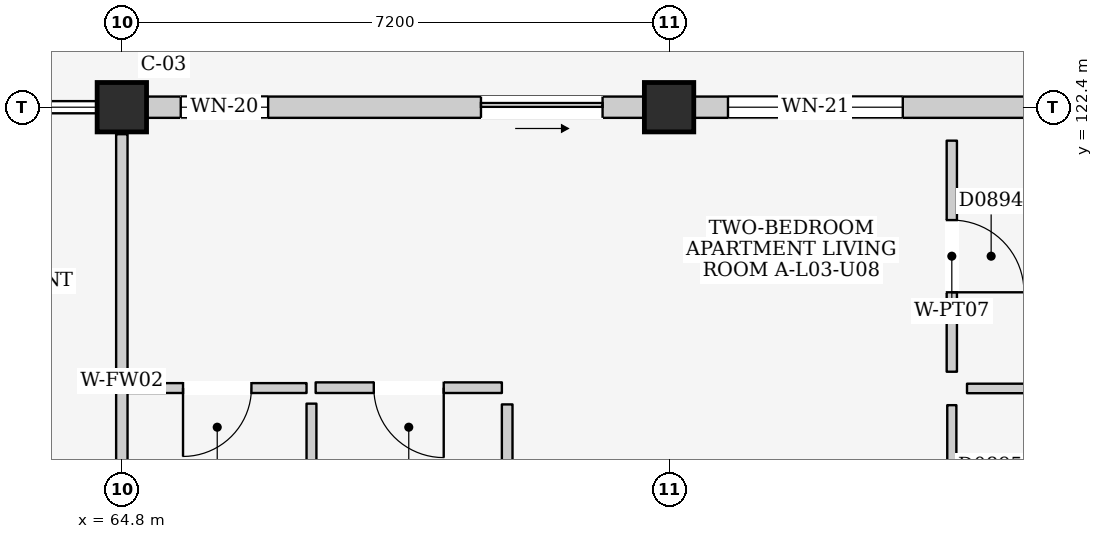
"""IFC4 building model, lengths in metres.
Left out: names, types, materials, properties, quantities, classifications, styles, units other than length and angle.
Written with IfcOpenShell. Run it as: python <this file> out.ifc"""

import sys

from ifc_helpers import new_model, si_unit, direction, frame, frame_2d, origin, origin_2d, place, context, subcontext, project, spatial, rectangle, extrude, element, fill, save


model = new_model("IFC4")
c1 = context("Model", 3, precision=1e-05, world=origin(), true_north=direction((0.0, 1.0)))
c2 = subcontext(c1, "Body", "Model", "MODEL_VIEW")
j1 = project(units=[si_unit("LENGTHUNIT", "METRE"), si_unit("PLANEANGLEUNIT", "RADIAN")], contexts=[c1])
p1 = place(None, origin())
s1 = spatial("IfcSite", under=j1, at=p1, CompositionType="ELEMENT")
p2 = place(p1, origin())
s2 = spatial("IfcBuilding", under=s1, at=p2, CompositionType="ELEMENT")
p3 = place(p2, frame((0.0, 0.0, 12.2)))
s3 = spatial("IfcBuildingStorey", under=s2, at=p3, CompositionType="ELEMENT", Elevation=12.2)
for number, where, z_axis, x_axis in (
    (1, (64.8, 122.4, 0.0), (0.0, 0.0, 1.0), (1.0, 0.0, 0.0)),
    (2, (72.0, 122.4, 0.0), (0.0, 0.0, 1.0), (1.0, 0.0, 0.0)),
):
    element("IfcColumn", number, at=place(p3, frame(where, z_axis=z_axis, x_axis=x_axis)), inside=s3, PredefinedType="COLUMN", context=c2, shape_type="SweptSolid", body=[
        extrude(rectangle(XDim=0.65, YDim=0.65, at=origin_2d()), origin(), (0.0, 0.0, 1.0), 3.2),
    ])
p4 = place(p3, frame((65.125, 122.4, 0.0), z_axis=(0.0, 0.0, 1.0), x_axis=(1.0, 0.0, 0.0)))
e3 = element("IfcWall", 3, at=p4, inside=s3, PredefinedType="ELEMENTEDWALL", context=c2, shape_type="SweptSolid", body=[
    extrude(rectangle(XDim=6.55, YDim=0.28, at=frame_2d((3.275, 0.0))), origin(), (0.0, 0.0, 1.0), 2.445),
])
p5 = place(p4, frame((4.4, 0.0, 0.0)))
e4 = element("IfcOpeningElement", 4, at=p5, cuts=e3, PredefinedType="OPENING", context=c2, shape_type="SweptSolid", body=[
    extrude(rectangle(XDim=1.6, YDim=2.12, at=frame_2d((0.8, 1.06))), frame((0.0, 0.155, 0.0), z_axis=(0.0, -1.0, 0.0), x_axis=(1.0, 0.0, 0.0)), (0.0, 0.0, 1.0), 0.31),
])
p6 = place(p4, frame((0.45, 0.0, 0.9)))
e5 = element("IfcOpeningElement", 5, at=p6, cuts=e3, PredefinedType="OPENING", context=c2, shape_type="SweptSolid", body=[
    extrude(rectangle(XDim=1.15, YDim=1.15, at=frame_2d((0.575, 0.575))), frame((0.0, 0.155, 0.0), z_axis=(0.0, -1.0, 0.0), x_axis=(1.0, 0.0, 0.0)), (0.0, 0.0, 1.0), 0.31),
])
p7 = place(p3, frame((72.325, 122.4, 0.0), z_axis=(0.0, 0.0, 1.0), x_axis=(1.0, 0.0, 0.0)))
e6 = element("IfcWall", 6, at=p7, inside=s3, PredefinedType="ELEMENTEDWALL", context=c2, shape_type="SweptSolid", body=[
    extrude(rectangle(XDim=6.55, YDim=0.28, at=frame_2d((3.275, 0.0))), origin(), (0.0, 0.0, 1.0), 2.445),
])
p8 = place(p7, frame((4.5, 0.0, 0.0)))
e7 = element("IfcOpeningElement", 7, at=p8, cuts=e6, PredefinedType="OPENING", context=c2, shape_type="SweptSolid", body=[
    extrude(rectangle(XDim=1.5, YDim=2.12, at=frame_2d((0.75, 1.06))), frame((0.0, 0.155, 0.0), z_axis=(0.0, -1.0, 0.0), x_axis=(1.0, 0.0, 0.0)), (0.0, 0.0, 1.0), 0.31),
])
p9 = place(p7, frame((0.45, 0.0, 0.735)))
e8 = element("IfcOpeningElement", 8, at=p9, cuts=e6, PredefinedType="OPENING", context=c2, shape_type="SweptSolid", body=[
    extrude(rectangle(XDim=2.3, YDim=1.6, at=frame_2d((1.15, 0.8))), frame((0.0, 0.155, 0.0), z_axis=(0.0, -1.0, 0.0), x_axis=(1.0, 0.0, 0.0)), (0.0, 0.0, 1.0), 0.31),
])
p10 = place(p3, frame((64.8, 115.555, 0.0), z_axis=(0.0, 0.0, 1.0), x_axis=(0.0, 1.0, 0.0)))
e9 = element("IfcWall", 9, at=p10, inside=s3, PredefinedType="PARTITIONING", context=c2, shape_type="SweptSolid", body=[
    extrude(rectangle(XDim=6.49, YDim=0.15, at=frame_2d((3.245, 0.0))), origin(), (0.0, 0.0, 1.0), 2.415),
])
p11 = place(p3, frame((64.88, 118.705, 0.0), z_axis=(0.0, 0.0, 1.0), x_axis=(1.0, 0.0, 0.0)))
e10 = element("IfcWall", 10, at=p11, inside=s3, PredefinedType="PARTITIONING", context=c2, shape_type="SweptSolid", body=[
    extrude(rectangle(XDim=2.35, YDim=0.13, at=frame_2d((1.175, 0.0))), origin(), (0.0, 0.0, 1.0), 2.98),
])
p12 = place(p11, frame((0.725, 0.0, 0.0)))
e11 = element("IfcOpeningElement", 11, at=p12, cuts=e10, PredefinedType="OPENING", context=c2, shape_type="SweptSolid", body=[
    extrude(rectangle(XDim=0.9, YDim=2.1, at=frame_2d((0.45, 1.05))), frame((0.0, 0.08, 0.0), z_axis=(0.0, -1.0, 0.0), x_axis=(1.0, 0.0, 0.0)), (0.0, 0.0, 1.0), 0.16),
])
p13 = place(p3, frame((67.295, 115.46, 0.0), z_axis=(0.0, 0.0, 1.0), x_axis=(0.0, 1.0, 0.0)))
e12 = element("IfcWall", 12, at=p13, inside=s3, PredefinedType="PARTITIONING", context=c2, shape_type="SweptSolid", body=[
    extrude(rectangle(XDim=3.04, YDim=0.13, at=frame_2d((1.52, 0.0))), origin(), (0.0, 0.0, 1.0), 2.98),
])
p14 = place(p3, frame((67.35, 118.71, 0.0), z_axis=(0.0, 0.0, 1.0), x_axis=(1.0, 0.0, 0.0)))
e13 = element("IfcWall", 13, at=p14, inside=s3, PredefinedType="PARTITIONING", context=c2, shape_type="SweptSolid", body=[
    extrude(rectangle(XDim=2.45, YDim=0.14, at=frame_2d((1.225, 0.0))), origin(), (0.0, 0.0, 1.0), 2.98),
])
p15 = place(p14, frame((0.765, 0.0, 0.0)))
e14 = element("IfcOpeningElement", 14, at=p15, cuts=e13, PredefinedType="OPENING", context=c2, shape_type="SweptSolid", body=[
    extrude(rectangle(XDim=0.92, YDim=2.1, at=frame_2d((0.46, 1.05))), frame((0.0, 0.085, 0.0), z_axis=(0.0, -1.0, 0.0), x_axis=(1.0, 0.0, 0.0)), (0.0, 0.0, 1.0), 0.17),
])
p16 = place(p3, frame((69.87, 115.43, 0.0), z_axis=(0.0, 0.0, 1.0), x_axis=(0.0, 1.0, 0.0)))
e15 = element("IfcWall", 15, at=p16, inside=s3, PredefinedType="PARTITIONING", context=c2, shape_type="SweptSolid", body=[
    extrude(rectangle(XDim=3.06, YDim=0.14, at=frame_2d((1.53, 0.0))), origin(), (0.0, 0.0, 1.0), 2.98),
])
p17 = place(p3, frame((75.72, 118.92, 0.0), z_axis=(0.0, 0.0, 1.0), x_axis=(0.0, 1.0, 0.0)))
e16 = element("IfcWall", 16, at=p17, inside=s3, PredefinedType="PARTITIONING", context=c2, shape_type="SweptSolid", body=[
    extrude(rectangle(XDim=3.04, YDim=0.135, at=frame_2d((1.52, 0.0))), origin(), (0.0, 0.0, 1.0), 2.98),
])
p18 = place(p17, frame((1.045, 0.0, 0.0)))
e17 = element("IfcOpeningElement", 17, at=p18, cuts=e16, PredefinedType="OPENING", context=c2, shape_type="SweptSolid", body=[
    extrude(rectangle(XDim=0.95, YDim=2.15, at=frame_2d((0.475, 1.075))), frame((0.0, 0.083, 0.0), z_axis=(0.0, -1.0, 0.0), x_axis=(1.0, 0.0, 0.0)), (0.0, 0.0, 1.0), 0.165),
])
p19 = place(p3, frame((75.92, 118.7, 0.0), z_axis=(0.0, 0.0, 1.0), x_axis=(1.0, 0.0, 0.0)))
e18 = element("IfcWall", 18, at=p19, inside=s3, PredefinedType="PARTITIONING", context=c2, shape_type="SweptSolid", body=[
    extrude(rectangle(XDim=3.06, YDim=0.125, at=frame_2d((1.53, 0.0))), origin(), (0.0, 0.0, 1.0), 2.98),
])
p20 = place(p3, frame((75.72, 115.44, 0.0), z_axis=(0.0, 0.0, 1.0), x_axis=(0.0, 1.0, 0.0)))
e19 = element("IfcWall", 19, at=p20, inside=s3, PredefinedType="PARTITIONING", context=c2, shape_type="SweptSolid", body=[
    extrude(rectangle(XDim=3.04, YDim=0.12, at=frame_2d((1.52, 0.0))), origin(), (0.0, 0.0, 1.0), 2.98),
])
p21 = place(p20, frame((1.04, 0.0, 0.0)))
e20 = element("IfcOpeningElement", 20, at=p21, cuts=e19, PredefinedType="OPENING", context=c2, shape_type="SweptSolid", body=[
    extrude(rectangle(XDim=0.96, YDim=2.15, at=frame_2d((0.48, 1.075))), frame((0.0, 0.075, 0.0), z_axis=(0.0, -1.0, 0.0), x_axis=(1.0, 0.0, 0.0)), (0.0, 0.0, 1.0), 0.15),
])
p22 = place(p5, frame((1.6, 0.0, 0.0), z_axis=(0.0, 0.0, 1.0), x_axis=(-1.0, 0.0, 0.0)))
e21 = element("IfcDoor", 21, at=p22, inside=s3, OperationType="SLIDING_TO_RIGHT", PredefinedType="DOOR", context=c2, shape_type="SweptSolid", body=[
    extrude(rectangle(XDim=1.6, YDim=2.12, at=frame_2d((0.8, 1.06))), frame((0.0, 0.025, 0.0), z_axis=(0.0, -1.0, 0.0), x_axis=(1.0, 0.0, 0.0)), (0.0, 0.0, 1.0), 0.05),
])
fill(e4, e21)
p23 = place(p6, origin())
e22 = element("IfcWindow", 22, at=p23, inside=s3, PartitioningType="SINGLE_PANEL", PredefinedType="WINDOW", context=c2, shape_type="SweptSolid", body=[
    extrude(rectangle(XDim=1.15, YDim=1.15, at=frame_2d((0.575, 0.575))), frame((0.0, 0.03, 0.0), z_axis=(0.0, -1.0, 0.0), x_axis=(1.0, 0.0, 0.0)), (0.0, 0.0, 1.0), 0.06),
])
fill(e5, e22)
p24 = place(p9, origin())
e23 = element("IfcWindow", 23, at=p24, inside=s3, PartitioningType="TRIPLE_PANEL_VERTICAL", PredefinedType="WINDOW", context=c2, shape_type="SweptSolid", body=[
    extrude(rectangle(XDim=2.3, YDim=1.6, at=frame_2d((1.15, 0.8))), frame((0.0, 0.03, 0.0), z_axis=(0.0, -1.0, 0.0), x_axis=(1.0, 0.0, 0.0)), (0.0, 0.0, 1.0), 0.06),
])
fill(e8, e23)
p25 = place(p12, frame((0.9, 0.0, 0.0), z_axis=(0.0, 0.0, 1.0), x_axis=(-1.0, 0.0, 0.0)))
e24 = element("IfcDoor", 24, at=p25, inside=s3, OperationType="SINGLE_SWING_RIGHT", PredefinedType="DOOR", context=c2, shape_type="SweptSolid", body=[
    extrude(rectangle(XDim=0.9, YDim=2.1, at=frame_2d((0.45, 1.05))), frame((0.0, 0.025, 0.0), z_axis=(0.0, -1.0, 0.0), x_axis=(1.0, 0.0, 0.0)), (0.0, 0.0, 1.0), 0.05),
])
fill(e11, e24)
p26 = place(p15, frame((0.92, 0.0, 0.0), z_axis=(0.0, 0.0, 1.0), x_axis=(-1.0, 0.0, 0.0)))
e25 = element("IfcDoor", 25, at=p26, inside=s3, OperationType="SINGLE_SWING_LEFT", PredefinedType="DOOR", context=c2, shape_type="SweptSolid", body=[
    extrude(rectangle(XDim=0.92, YDim=2.1, at=frame_2d((0.46, 1.05))), frame((0.0, 0.025, 0.0), z_axis=(0.0, -1.0, 0.0), x_axis=(1.0, 0.0, 0.0)), (0.0, 0.0, 1.0), 0.05),
])
fill(e14, e25)
p27 = place(p18, frame((0.95, 0.0, 0.0), z_axis=(0.0, 0.0, 1.0), x_axis=(-1.0, 0.0, 0.0)))
e26 = element("IfcDoor", 26, at=p27, inside=s3, OperationType="SINGLE_SWING_RIGHT", PredefinedType="DOOR", context=c2, shape_type="SweptSolid", body=[
    extrude(rectangle(XDim=0.95, YDim=2.15, at=frame_2d((0.475, 1.075))), frame((0.0, 0.025, 0.0), z_axis=(0.0, -1.0, 0.0), x_axis=(1.0, 0.0, 0.0)), (0.0, 0.0, 1.0), 0.05),
])
fill(e17, e26)
save(model, sys.argv[1])
